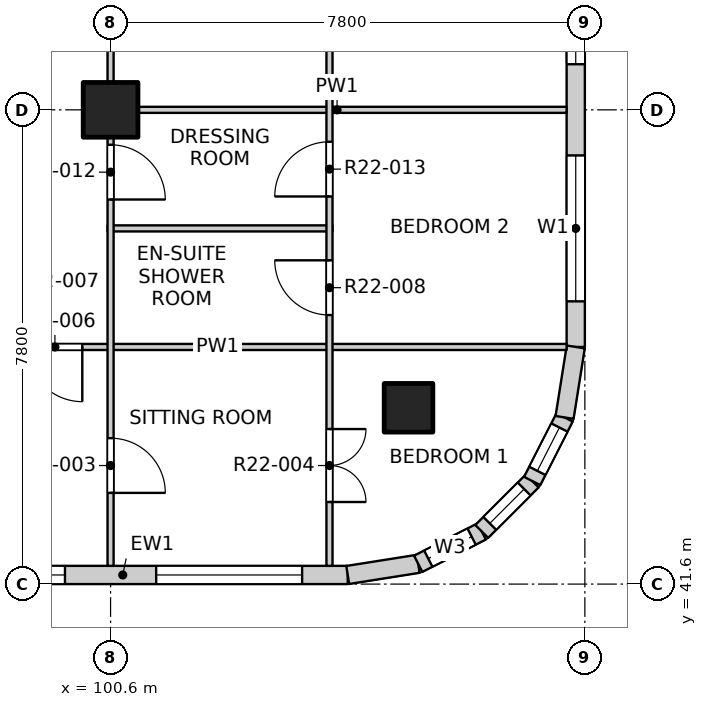
"""IFC4 building model, lengths in metres.
Left out: names, types, materials, properties, quantities, classifications, styles, units other than length and angle.
Written with IfcOpenShell. Run it as: python <this file> out.ifc"""

import sys

from ifc_helpers import new_model, si_unit, direction, frame, frame_2d, origin, origin_2d, place, context, subcontext, project, spatial, rectangle, extrude, element, fill, save


model = new_model("IFC4")
c1 = context("Model", 3, precision=1e-05, world=origin(), true_north=direction((0.0, 1.0)))
c2 = subcontext(c1, "Body", "Model", "MODEL_VIEW")
j1 = project(units=[si_unit("LENGTHUNIT", "METRE"), si_unit("PLANEANGLEUNIT", "RADIAN")], contexts=[c1])
p1 = place(None, origin())
s1 = spatial("IfcSite", under=j1, at=p1, CompositionType="ELEMENT")
p2 = place(p1, origin())
s2 = spatial("IfcBuilding", under=s1, at=p2, CompositionType="ELEMENT")
p3 = place(p2, frame((0.0, 0.0, 231.3)))
s3 = spatial("IfcBuildingStorey", under=s2, at=p3, CompositionType="ELEMENT", Elevation=231.3)
p4 = place(p3, frame((105.5, 44.5, -0.25), z_axis=(0.0, 0.0, 1.0), x_axis=(1.0, 0.0, 0.0)))
e1 = element("IfcColumn", 1, at=p4, inside=s3, PredefinedType="COLUMN", context=c2, shape_type="SweptSolid", body=[
    extrude(rectangle(XDim=0.8, YDim=0.8, at=origin_2d()), origin(), (0.0, 0.0, 1.0), 3.4),
])
p5 = place(p3, frame((100.6, 49.4, -0.25), z_axis=(0.0, 0.0, 1.0), x_axis=(1.0, 0.0, 0.0)))
e2 = element("IfcColumn", 2, at=p5, inside=s3, PredefinedType="COLUMN", context=c2, shape_type="SweptSolid", body=[
    extrude(rectangle(XDim=0.9, YDim=0.9, at=origin_2d()), origin(), (0.0, 0.0, 1.0), 3.4),
])
p6 = place(p3, frame((97.1, 41.75, 0.0), z_axis=(0.0, 0.0, 1.0), x_axis=(1.0, 0.0, 0.0)))
e3 = element("IfcWall", 3, at=p6, inside=s3, PredefinedType="SOLIDWALL", context=c2, shape_type="SweptSolid", body=[
    extrude(rectangle(XDim=7.4, YDim=0.3, at=frame_2d((3.7, 0.0))), origin(), (0.0, 0.0, 1.0), 2.7),
])
p7 = place(p6, frame((0.35, 0.0, 0.9)))
e4 = element("IfcOpeningElement", 4, at=p7, cuts=e3, PredefinedType="OPENING", context=c2, shape_type="SweptSolid", body=[
    extrude(rectangle(XDim=2.4, YDim=1.8, at=frame_2d((1.2, 0.9))), frame((0.0, 0.16, 0.0), z_axis=(0.0, -1.0, 0.0), x_axis=(1.0, 0.0, 0.0)), (0.0, 0.0, 1.0), 0.32),
])
p8 = place(p6, frame((4.25, 0.0, 0.9)))
e5 = element("IfcOpeningElement", 5, at=p8, cuts=e3, PredefinedType="OPENING", context=c2, shape_type="SweptSolid", body=[
    extrude(rectangle(XDim=2.4, YDim=1.8, at=frame_2d((1.2, 0.9))), frame((0.0, 0.16, 0.0), z_axis=(0.0, -1.0, 0.0), x_axis=(1.0, 0.0, 0.0)), (0.0, 0.0, 1.0), 0.32),
])
p9 = place(p3, frame((108.25, 45.5, 0.0), z_axis=(0.0, 0.0, 1.0), x_axis=(0.0, 1.0, 0.0)))
e6 = element("IfcWall", 6, at=p9, inside=s3, PredefinedType="SOLIDWALL", context=c2, shape_type="SweptSolid", body=[
    extrude(rectangle(XDim=7.4, YDim=0.3, at=frame_2d((3.7, 0.0))), origin(), (0.0, 0.0, 1.0), 2.7),
])
p10 = place(p9, frame((0.75, 0.0, 0.9)))
e7 = element("IfcOpeningElement", 7, at=p10, cuts=e6, PredefinedType="OPENING", context=c2, shape_type="SweptSolid", body=[
    extrude(rectangle(XDim=2.4, YDim=1.8, at=frame_2d((1.2, 0.9))), frame((0.0, 0.16, 0.0), z_axis=(0.0, -1.0, 0.0), x_axis=(1.0, 0.0, 0.0)), (0.0, 0.0, 1.0), 0.32),
])
p11 = place(p9, frame((4.65, 0.0, 0.9)))
e8 = element("IfcOpeningElement", 8, at=p11, cuts=e6, PredefinedType="OPENING", context=c2, shape_type="SweptSolid", body=[
    extrude(rectangle(XDim=2.4, YDim=1.8, at=frame_2d((1.2, 0.9))), frame((0.0, 0.16, 0.0), z_axis=(0.0, -1.0, 0.0), x_axis=(1.0, 0.0, 0.0)), (0.0, 0.0, 1.0), 0.32),
])
p12 = place(p3, frame((104.5, 41.75, 0.0), z_axis=(0.0, 0.0, 1.0), x_axis=(0.987678452879, 0.156496880861, 0.0)))
e9 = element("IfcWall", 9, at=p12, inside=s3, PredefinedType="SOLIDWALL", context=c2, shape_type="SweptSolid", body=[
    extrude(rectangle(XDim=1.173, YDim=0.3, at=frame_2d((0.586, 0.0))), origin(), (0.0, 0.0, 1.0), 2.7),
])
p13 = place(p3, frame((105.659, 41.934, 0.0), z_axis=(0.0, 0.0, 1.0), x_axis=(0.890988677504, 0.454025524128, 0.0)))
e10 = element("IfcWall", 10, at=p13, inside=s3, PredefinedType="SOLIDWALL", context=c2, shape_type="SweptSolid", body=[
    extrude(rectangle(XDim=1.173, YDim=0.3, at=frame_2d((0.587, 0.0))), origin(), (0.0, 0.0, 1.0), 2.7),
])
p14 = place(p13, frame((0.187, 0.0, 0.9)))
e11 = element("IfcOpeningElement", 11, at=p14, cuts=e10, PredefinedType="OPENING", context=c2, shape_type="SweptSolid", body=[
    extrude(rectangle(XDim=0.8, YDim=1.2, at=frame_2d((0.4, 0.6))), frame((0.0, 0.16, 0.0), z_axis=(0.0, -1.0, 0.0), x_axis=(1.0, 0.0, 0.0)), (0.0, 0.0, 1.0), 0.32),
])
p15 = place(p3, frame((106.704, 42.466, 0.0), z_axis=(0.0, 0.0, 1.0), x_axis=(0.707106781187, 0.707106781187, 0.0)))
e12 = element("IfcWall", 12, at=p15, inside=s3, PredefinedType="SOLIDWALL", context=c2, shape_type="SweptSolid", body=[
    extrude(rectangle(XDim=1.173, YDim=0.3, at=frame_2d((0.586, 0.0))), origin(), (0.0, 0.0, 1.0), 2.7),
])
p16 = place(p15, frame((0.187, 0.0, 0.9)))
e13 = element("IfcOpeningElement", 13, at=p16, cuts=e12, PredefinedType="OPENING", context=c2, shape_type="SweptSolid", body=[
    extrude(rectangle(XDim=0.8, YDim=1.2, at=frame_2d((0.4, 0.6))), frame((0.0, 0.16, 0.0), z_axis=(0.0, -1.0, 0.0), x_axis=(1.0, 0.0, 0.0)), (0.0, 0.0, 1.0), 0.32),
])
p17 = place(p3, frame((107.534, 43.296, 0.0), z_axis=(0.0, 0.0, 1.0), x_axis=(0.454025524128, 0.890988677504, 0.0)))
e14 = element("IfcWall", 14, at=p17, inside=s3, PredefinedType="SOLIDWALL", context=c2, shape_type="SweptSolid", body=[
    extrude(rectangle(XDim=1.173, YDim=0.3, at=frame_2d((0.587, 0.0))), origin(), (0.0, 0.0, 1.0), 2.7),
])
p18 = place(p17, frame((0.187, 0.0, 0.9)))
e15 = element("IfcOpeningElement", 15, at=p18, cuts=e14, PredefinedType="OPENING", context=c2, shape_type="SweptSolid", body=[
    extrude(rectangle(XDim=0.8, YDim=1.2, at=frame_2d((0.4, 0.6))), frame((0.0, 0.16, 0.0), z_axis=(0.0, -1.0, 0.0), x_axis=(1.0, 0.0, 0.0)), (0.0, 0.0, 1.0), 0.32),
])
p19 = place(p3, frame((108.066, 44.341, 0.0), z_axis=(0.0, 0.0, 1.0), x_axis=(0.156496880861, 0.987678452879, 0.0)))
e16 = element("IfcWall", 16, at=p19, inside=s3, PredefinedType="SOLIDWALL", context=c2, shape_type="SweptSolid", body=[
    extrude(rectangle(XDim=1.173, YDim=0.3, at=frame_2d((0.586, 0.0))), origin(), (0.0, 0.0, 1.0), 2.7),
])
p20 = place(p3, frame((96.625, 45.5, 0.0), z_axis=(0.0, 0.0, 1.0), x_axis=(1.0, 0.0, 0.0)))
e17 = element("IfcWall", 17, at=p20, inside=s3, PredefinedType="PARTITIONING", context=c2, shape_type="SweptSolid", body=[
    extrude(rectangle(XDim=11.475, YDim=0.1, at=frame_2d((5.738, 0.0))), origin(), (0.0, 0.0, 1.0), 3.15),
])
p21 = place(p20, frame((2.61, 0.0, 0.0)))
e18 = element("IfcOpeningElement", 18, at=p21, cuts=e17, PredefinedType="OPENING", context=c2, shape_type="SweptSolid", body=[
    extrude(rectangle(XDim=0.9, YDim=2.1, at=frame_2d((0.45, 1.05))), frame((0.0, 0.06, 0.0), z_axis=(0.0, -1.0, 0.0), x_axis=(1.0, 0.0, 0.0)), (0.0, 0.0, 1.0), 0.12),
])
p22 = place(p3, frame((100.55, 47.45, 0.0), z_axis=(0.0, 0.0, 1.0), x_axis=(1.0, 0.0, 0.0)))
e19 = element("IfcWall", 19, at=p22, inside=s3, PredefinedType="PARTITIONING", context=c2, shape_type="SweptSolid", body=[
    extrude(rectangle(XDim=3.7, YDim=0.1, at=frame_2d((1.85, 0.0))), origin(), (0.0, 0.0, 1.0), 3.15),
])
p23 = place(p3, frame((100.55, 49.4, 0.0), z_axis=(0.0, 0.0, 1.0), x_axis=(1.0, 0.0, 0.0)))
e20 = element("IfcWall", 20, at=p23, inside=s3, PredefinedType="PARTITIONING", context=c2, shape_type="SweptSolid", body=[
    extrude(rectangle(XDim=7.55, YDim=0.1, at=frame_2d((3.775, 0.0))), origin(), (0.0, 0.0, 1.0), 3.15),
])
p24 = place(p3, frame((100.6, 41.9, 0.0), z_axis=(0.0, 0.0, 1.0), x_axis=(0.0, 1.0, 0.0)))
e21 = element("IfcWall", 21, at=p24, inside=s3, PredefinedType="PARTITIONING", context=c2, shape_type="SweptSolid", body=[
    extrude(rectangle(XDim=46.2, YDim=0.1, at=frame_2d((23.1, 0.0))), origin(), (0.0, 0.0, 1.0), 3.15),
])
p25 = place(p24, frame((1.2, 0.0, 0.0)))
e22 = element("IfcOpeningElement", 22, at=p25, cuts=e21, PredefinedType="OPENING", context=c2, shape_type="SweptSolid", body=[
    extrude(rectangle(XDim=0.9, YDim=2.1, at=frame_2d((0.45, 1.05))), frame((0.0, 0.06, 0.0), z_axis=(0.0, -1.0, 0.0), x_axis=(1.0, 0.0, 0.0)), (0.0, 0.0, 1.0), 0.12),
])
p26 = place(p24, frame((6.025, 0.0, 0.0)))
e23 = element("IfcOpeningElement", 23, at=p26, cuts=e21, PredefinedType="OPENING", context=c2, shape_type="SweptSolid", body=[
    extrude(rectangle(XDim=0.9, YDim=2.1, at=frame_2d((0.45, 1.05))), frame((0.0, 0.06, 0.0), z_axis=(0.0, -1.0, 0.0), x_axis=(1.0, 0.0, 0.0)), (0.0, 0.0, 1.0), 0.12),
])
p27 = place(p24, frame((9.0, 0.0, 0.0)))
e24 = element("IfcOpeningElement", 24, at=p27, cuts=e21, PredefinedType="OPENING", context=c2, shape_type="SweptSolid", body=[
    extrude(rectangle(XDim=0.9, YDim=2.1, at=frame_2d((0.45, 1.05))), frame((0.0, 0.06, 0.0), z_axis=(0.0, -1.0, 0.0), x_axis=(1.0, 0.0, 0.0)), (0.0, 0.0, 1.0), 0.12),
])
p28 = place(p24, frame((12.9, 0.0, 0.0)))
e25 = element("IfcOpeningElement", 25, at=p28, cuts=e21, PredefinedType="OPENING", context=c2, shape_type="SweptSolid", body=[
    extrude(rectangle(XDim=0.9, YDim=2.1, at=frame_2d((0.45, 1.05))), frame((0.0, 0.06, 0.0), z_axis=(0.0, -1.0, 0.0), x_axis=(1.0, 0.0, 0.0)), (0.0, 0.0, 1.0), 0.12),
])
p29 = place(p24, frame((17.775, 0.0, 0.0)))
e26 = element("IfcOpeningElement", 26, at=p29, cuts=e21, PredefinedType="OPENING", context=c2, shape_type="SweptSolid", body=[
    extrude(rectangle(XDim=0.9, YDim=2.1, at=frame_2d((0.45, 1.05))), frame((0.0, 0.06, 0.0), z_axis=(0.0, -1.0, 0.0), x_axis=(1.0, 0.0, 0.0)), (0.0, 0.0, 1.0), 0.12),
])
p30 = place(p24, frame((21.625, 0.0, 0.0)))
e27 = element("IfcOpeningElement", 27, at=p30, cuts=e21, PredefinedType="OPENING", context=c2, shape_type="SweptSolid", body=[
    extrude(rectangle(XDim=0.9, YDim=2.1, at=frame_2d((0.45, 1.05))), frame((0.0, 0.06, 0.0), z_axis=(0.0, -1.0, 0.0), x_axis=(1.0, 0.0, 0.0)), (0.0, 0.0, 1.0), 0.12),
])
p31 = place(p24, frame((25.575, 0.0, 0.0)))
e28 = element("IfcOpeningElement", 28, at=p31, cuts=e21, PredefinedType="OPENING", context=c2, shape_type="SweptSolid", body=[
    extrude(rectangle(XDim=0.9, YDim=2.1, at=frame_2d((0.45, 1.05))), frame((0.0, 0.06, 0.0), z_axis=(0.0, -1.0, 0.0), x_axis=(1.0, 0.0, 0.0)), (0.0, 0.0, 1.0), 0.12),
])
p32 = place(p24, frame((28.5, 0.0, 0.0)))
e29 = element("IfcOpeningElement", 29, at=p32, cuts=e21, PredefinedType="OPENING", context=c2, shape_type="SweptSolid", body=[
    extrude(rectangle(XDim=0.9, YDim=2.1, at=frame_2d((0.45, 1.05))), frame((0.0, 0.06, 0.0), z_axis=(0.0, -1.0, 0.0), x_axis=(1.0, 0.0, 0.0)), (0.0, 0.0, 1.0), 0.12),
])
p33 = place(p24, frame((33.375, 0.0, 0.0)))
e30 = element("IfcOpeningElement", 30, at=p33, cuts=e21, PredefinedType="OPENING", context=c2, shape_type="SweptSolid", body=[
    extrude(rectangle(XDim=0.9, YDim=2.1, at=frame_2d((0.45, 1.05))), frame((0.0, 0.06, 0.0), z_axis=(0.0, -1.0, 0.0), x_axis=(1.0, 0.0, 0.0)), (0.0, 0.0, 1.0), 0.12),
])
p34 = place(p24, frame((36.3, 0.0, 0.0)))
e31 = element("IfcOpeningElement", 31, at=p34, cuts=e21, PredefinedType="OPENING", context=c2, shape_type="SweptSolid", body=[
    extrude(rectangle(XDim=0.9, YDim=2.1, at=frame_2d((0.45, 1.05))), frame((0.0, 0.06, 0.0), z_axis=(0.0, -1.0, 0.0), x_axis=(1.0, 0.0, 0.0)), (0.0, 0.0, 1.0), 0.12),
])
p35 = place(p24, frame((40.2, 0.0, 0.0)))
e32 = element("IfcOpeningElement", 32, at=p35, cuts=e21, PredefinedType="OPENING", context=c2, shape_type="SweptSolid", body=[
    extrude(rectangle(XDim=0.9, YDim=2.1, at=frame_2d((0.45, 1.05))), frame((0.0, 0.06, 0.0), z_axis=(0.0, -1.0, 0.0), x_axis=(1.0, 0.0, 0.0)), (0.0, 0.0, 1.0), 0.12),
])
p36 = place(p24, frame((44.1, 0.0, 0.0)))
e33 = element("IfcOpeningElement", 33, at=p36, cuts=e21, PredefinedType="OPENING", context=c2, shape_type="SweptSolid", body=[
    extrude(rectangle(XDim=0.9, YDim=2.1, at=frame_2d((0.45, 1.05))), frame((0.0, 0.06, 0.0), z_axis=(0.0, -1.0, 0.0), x_axis=(1.0, 0.0, 0.0)), (0.0, 0.0, 1.0), 0.12),
])
p37 = place(p3, frame((104.2, 41.9, 0.0), z_axis=(0.0, 0.0, 1.0), x_axis=(0.0, 1.0, 0.0)))
e34 = element("IfcWall", 34, at=p37, inside=s3, PredefinedType="PARTITIONING", context=c2, shape_type="SweptSolid", body=[
    extrude(rectangle(XDim=34.7, YDim=0.1, at=frame_2d((17.35, 0.0))), origin(), (0.0, 0.0, 1.0), 3.15),
])
p38 = place(p37, frame((1.05, 0.0, 0.0)))
e35 = element("IfcOpeningElement", 35, at=p38, cuts=e34, PredefinedType="OPENING", context=c2, shape_type="SweptSolid", body=[
    extrude(rectangle(XDim=1.2, YDim=2.1, at=frame_2d((0.6, 1.05))), frame((0.0, 0.06, 0.0), z_axis=(0.0, -1.0, 0.0), x_axis=(1.0, 0.0, 0.0)), (0.0, 0.0, 1.0), 0.12),
])
p39 = place(p37, frame((4.125, 0.0, 0.0)))
e36 = element("IfcOpeningElement", 36, at=p39, cuts=e34, PredefinedType="OPENING", context=c2, shape_type="SweptSolid", body=[
    extrude(rectangle(XDim=0.9, YDim=2.1, at=frame_2d((0.45, 1.05))), frame((0.0, 0.06, 0.0), z_axis=(0.0, -1.0, 0.0), x_axis=(1.0, 0.0, 0.0)), (0.0, 0.0, 1.0), 0.12),
])
p40 = place(p37, frame((6.075, 0.0, 0.0)))
e37 = element("IfcOpeningElement", 37, at=p40, cuts=e34, PredefinedType="OPENING", context=c2, shape_type="SweptSolid", body=[
    extrude(rectangle(XDim=0.9, YDim=2.1, at=frame_2d((0.45, 1.05))), frame((0.0, 0.06, 0.0), z_axis=(0.0, -1.0, 0.0), x_axis=(1.0, 0.0, 0.0)), (0.0, 0.0, 1.0), 0.12),
])
p41 = place(p37, frame((8.85, 0.0, 0.0)))
e38 = element("IfcOpeningElement", 38, at=p41, cuts=e34, PredefinedType="OPENING", context=c2, shape_type="SweptSolid", body=[
    extrude(rectangle(XDim=1.2, YDim=2.1, at=frame_2d((0.6, 1.05))), frame((0.0, 0.06, 0.0), z_axis=(0.0, -1.0, 0.0), x_axis=(1.0, 0.0, 0.0)), (0.0, 0.0, 1.0), 0.12),
])
p42 = place(p37, frame((12.75, 0.0, 0.0)))
e39 = element("IfcOpeningElement", 39, at=p42, cuts=e34, PredefinedType="OPENING", context=c2, shape_type="SweptSolid", body=[
    extrude(rectangle(XDim=1.2, YDim=2.1, at=frame_2d((0.6, 1.05))), frame((0.0, 0.06, 0.0), z_axis=(0.0, -1.0, 0.0), x_axis=(1.0, 0.0, 0.0)), (0.0, 0.0, 1.0), 0.12),
])
p43 = place(p37, frame((15.825, 0.0, 0.0)))
e40 = element("IfcOpeningElement", 40, at=p43, cuts=e34, PredefinedType="OPENING", context=c2, shape_type="SweptSolid", body=[
    extrude(rectangle(XDim=0.9, YDim=2.1, at=frame_2d((0.45, 1.05))), frame((0.0, 0.06, 0.0), z_axis=(0.0, -1.0, 0.0), x_axis=(1.0, 0.0, 0.0)), (0.0, 0.0, 1.0), 0.12),
])
p44 = place(p37, frame((17.775, 0.0, 0.0)))
e41 = element("IfcOpeningElement", 41, at=p44, cuts=e34, PredefinedType="OPENING", context=c2, shape_type="SweptSolid", body=[
    extrude(rectangle(XDim=0.9, YDim=2.1, at=frame_2d((0.45, 1.05))), frame((0.0, 0.06, 0.0), z_axis=(0.0, -1.0, 0.0), x_axis=(1.0, 0.0, 0.0)), (0.0, 0.0, 1.0), 0.12),
])
p45 = place(p37, frame((19.725, 0.0, 0.0)))
e42 = element("IfcOpeningElement", 42, at=p45, cuts=e34, PredefinedType="OPENING", context=c2, shape_type="SweptSolid", body=[
    extrude(rectangle(XDim=0.9, YDim=2.1, at=frame_2d((0.45, 1.05))), frame((0.0, 0.06, 0.0), z_axis=(0.0, -1.0, 0.0), x_axis=(1.0, 0.0, 0.0)), (0.0, 0.0, 1.0), 0.12),
])
p46 = place(p37, frame((21.675, 0.0, 0.0)))
e43 = element("IfcOpeningElement", 43, at=p46, cuts=e34, PredefinedType="OPENING", context=c2, shape_type="SweptSolid", body=[
    extrude(rectangle(XDim=0.9, YDim=2.1, at=frame_2d((0.45, 1.05))), frame((0.0, 0.06, 0.0), z_axis=(0.0, -1.0, 0.0), x_axis=(1.0, 0.0, 0.0)), (0.0, 0.0, 1.0), 0.12),
])
p47 = place(p37, frame((23.625, 0.0, 0.0)))
e44 = element("IfcOpeningElement", 44, at=p47, cuts=e34, PredefinedType="OPENING", context=c2, shape_type="SweptSolid", body=[
    extrude(rectangle(XDim=0.9, YDim=2.1, at=frame_2d((0.45, 1.05))), frame((0.0, 0.06, 0.0), z_axis=(0.0, -1.0, 0.0), x_axis=(1.0, 0.0, 0.0)), (0.0, 0.0, 1.0), 0.12),
])
p48 = place(p37, frame((25.575, 0.0, 0.0)))
e45 = element("IfcOpeningElement", 45, at=p48, cuts=e34, PredefinedType="OPENING", context=c2, shape_type="SweptSolid", body=[
    extrude(rectangle(XDim=0.9, YDim=2.1, at=frame_2d((0.45, 1.05))), frame((0.0, 0.06, 0.0), z_axis=(0.0, -1.0, 0.0), x_axis=(1.0, 0.0, 0.0)), (0.0, 0.0, 1.0), 0.12),
])
p49 = place(p37, frame((28.35, 0.0, 0.0)))
e46 = element("IfcOpeningElement", 46, at=p49, cuts=e34, PredefinedType="OPENING", context=c2, shape_type="SweptSolid", body=[
    extrude(rectangle(XDim=1.2, YDim=2.1, at=frame_2d((0.6, 1.05))), frame((0.0, 0.06, 0.0), z_axis=(0.0, -1.0, 0.0), x_axis=(1.0, 0.0, 0.0)), (0.0, 0.0, 1.0), 0.12),
])
p50 = place(p37, frame((31.425, 0.0, 0.0)))
e47 = element("IfcOpeningElement", 47, at=p50, cuts=e34, PredefinedType="OPENING", context=c2, shape_type="SweptSolid", body=[
    extrude(rectangle(XDim=0.9, YDim=2.1, at=frame_2d((0.45, 1.05))), frame((0.0, 0.06, 0.0), z_axis=(0.0, -1.0, 0.0), x_axis=(1.0, 0.0, 0.0)), (0.0, 0.0, 1.0), 0.12),
])
p51 = place(p37, frame((33.375, 0.0, 0.0)))
e48 = element("IfcOpeningElement", 48, at=p51, cuts=e34, PredefinedType="OPENING", context=c2, shape_type="SweptSolid", body=[
    extrude(rectangle(XDim=0.9, YDim=2.1, at=frame_2d((0.45, 1.05))), frame((0.0, 0.06, 0.0), z_axis=(0.0, -1.0, 0.0), x_axis=(1.0, 0.0, 0.0)), (0.0, 0.0, 1.0), 0.12),
])
p52 = place(p7, origin())
e49 = element("IfcWindow", 49, at=p52, inside=s3, PartitioningType="DOUBLE_PANEL_VERTICAL", PredefinedType="WINDOW", context=c2, shape_type="SweptSolid", body=[
    extrude(rectangle(XDim=2.4, YDim=1.8, at=frame_2d((1.2, 0.9))), frame((0.0, 0.03, 0.0), z_axis=(0.0, -1.0, 0.0), x_axis=(1.0, 0.0, 0.0)), (0.0, 0.0, 1.0), 0.06),
])
fill(e4, e49)
p53 = place(p8, origin())
e50 = element("IfcWindow", 50, at=p53, inside=s3, PartitioningType="DOUBLE_PANEL_VERTICAL", PredefinedType="WINDOW", context=c2, shape_type="SweptSolid", body=[
    extrude(rectangle(XDim=2.4, YDim=1.8, at=frame_2d((1.2, 0.9))), frame((0.0, 0.03, 0.0), z_axis=(0.0, -1.0, 0.0), x_axis=(1.0, 0.0, 0.0)), (0.0, 0.0, 1.0), 0.06),
])
fill(e5, e50)
p54 = place(p10, origin())
e51 = element("IfcWindow", 51, at=p54, inside=s3, PartitioningType="DOUBLE_PANEL_VERTICAL", PredefinedType="WINDOW", context=c2, shape_type="SweptSolid", body=[
    extrude(rectangle(XDim=2.4, YDim=1.8, at=frame_2d((1.2, 0.9))), frame((0.0, 0.03, 0.0), z_axis=(0.0, -1.0, 0.0), x_axis=(1.0, 0.0, 0.0)), (0.0, 0.0, 1.0), 0.06),
])
fill(e7, e51)
p55 = place(p11, origin())
e52 = element("IfcWindow", 52, at=p55, inside=s3, PartitioningType="DOUBLE_PANEL_VERTICAL", PredefinedType="WINDOW", context=c2, shape_type="SweptSolid", body=[
    extrude(rectangle(XDim=2.4, YDim=1.8, at=frame_2d((1.2, 0.9))), frame((0.0, 0.03, 0.0), z_axis=(0.0, -1.0, 0.0), x_axis=(1.0, 0.0, 0.0)), (0.0, 0.0, 1.0), 0.06),
])
fill(e8, e52)
p56 = place(p14, origin())
e53 = element("IfcWindow", 53, at=p56, inside=s3, PartitioningType="SINGLE_PANEL", PredefinedType="WINDOW", context=c2, shape_type="SweptSolid", body=[
    extrude(rectangle(XDim=0.8, YDim=1.2, at=frame_2d((0.4, 0.6))), frame((0.0, 0.03, 0.0), z_axis=(0.0, -1.0, 0.0), x_axis=(1.0, 0.0, 0.0)), (0.0, 0.0, 1.0), 0.06),
])
fill(e11, e53)
p57 = place(p16, origin())
e54 = element("IfcWindow", 54, at=p57, inside=s3, PartitioningType="SINGLE_PANEL", PredefinedType="WINDOW", context=c2, shape_type="SweptSolid", body=[
    extrude(rectangle(XDim=0.8, YDim=1.2, at=frame_2d((0.4, 0.6))), frame((0.0, 0.03, 0.0), z_axis=(0.0, -1.0, 0.0), x_axis=(1.0, 0.0, 0.0)), (0.0, 0.0, 1.0), 0.06),
])
fill(e13, e54)
p58 = place(p18, origin())
e55 = element("IfcWindow", 55, at=p58, inside=s3, PartitioningType="SINGLE_PANEL", PredefinedType="WINDOW", context=c2, shape_type="SweptSolid", body=[
    extrude(rectangle(XDim=0.8, YDim=1.2, at=frame_2d((0.4, 0.6))), frame((0.0, 0.03, 0.0), z_axis=(0.0, -1.0, 0.0), x_axis=(1.0, 0.0, 0.0)), (0.0, 0.0, 1.0), 0.06),
])
fill(e15, e55)
p59 = place(p25, origin())
e56 = element("IfcDoor", 56, at=p59, inside=s3, OperationType="SINGLE_SWING_RIGHT", PredefinedType="DOOR", context=c2, shape_type="SweptSolid", body=[
    extrude(rectangle(XDim=0.9, YDim=2.1, at=frame_2d((0.45, 1.05))), frame((0.0, 0.025, 0.0), z_axis=(0.0, -1.0, 0.0), x_axis=(1.0, 0.0, 0.0)), (0.0, 0.0, 1.0), 0.05),
])
fill(e22, e56)
p60 = place(p38, origin())
e57 = element("IfcDoor", 57, at=p60, inside=s3, OperationType="DOUBLE_DOOR_SINGLE_SWING", PredefinedType="DOOR", context=c2, shape_type="SweptSolid", body=[
    extrude(rectangle(XDim=1.2, YDim=2.1, at=frame_2d((0.6, 1.05))), frame((0.0, 0.025, 0.0), z_axis=(0.0, -1.0, 0.0), x_axis=(1.0, 0.0, 0.0)), (0.0, 0.0, 1.0), 0.05),
])
fill(e35, e57)
p61 = place(p21, origin())
e58 = element("IfcDoor", 58, at=p61, inside=s3, OperationType="SINGLE_SWING_LEFT", PredefinedType="DOOR", context=c2, shape_type="SweptSolid", body=[
    extrude(rectangle(XDim=0.9, YDim=2.1, at=frame_2d((0.45, 1.05))), frame((0.0, 0.025, 0.0), z_axis=(0.0, -1.0, 0.0), x_axis=(1.0, 0.0, 0.0)), (0.0, 0.0, 1.0), 0.05),
])
fill(e18, e58)
p62 = place(p39, origin())
e59 = element("IfcDoor", 59, at=p62, inside=s3, OperationType="SINGLE_SWING_RIGHT", PredefinedType="DOOR", context=c2, shape_type="SweptSolid", body=[
    extrude(rectangle(XDim=0.9, YDim=2.1, at=frame_2d((0.45, 1.05))), frame((0.0, 0.025, 0.0), z_axis=(0.0, -1.0, 0.0), x_axis=(1.0, 0.0, 0.0)), (0.0, 0.0, 1.0), 0.05),
])
fill(e36, e59)
p63 = place(p26, origin())
e60 = element("IfcDoor", 60, at=p63, inside=s3, OperationType="SINGLE_SWING_RIGHT", PredefinedType="DOOR", context=c2, shape_type="SweptSolid", body=[
    extrude(rectangle(XDim=0.9, YDim=2.1, at=frame_2d((0.45, 1.05))), frame((0.0, 0.025, 0.0), z_axis=(0.0, -1.0, 0.0), x_axis=(1.0, 0.0, 0.0)), (0.0, 0.0, 1.0), 0.05),
])
fill(e23, e60)
p64 = place(p40, origin())
e61 = element("IfcDoor", 61, at=p64, inside=s3, OperationType="SINGLE_SWING_LEFT", PredefinedType="DOOR", context=c2, shape_type="SweptSolid", body=[
    extrude(rectangle(XDim=0.9, YDim=2.1, at=frame_2d((0.45, 1.05))), frame((0.0, 0.025, 0.0), z_axis=(0.0, -1.0, 0.0), x_axis=(1.0, 0.0, 0.0)), (0.0, 0.0, 1.0), 0.05),
])
fill(e37, e61)
save(model, sys.argv[1])
